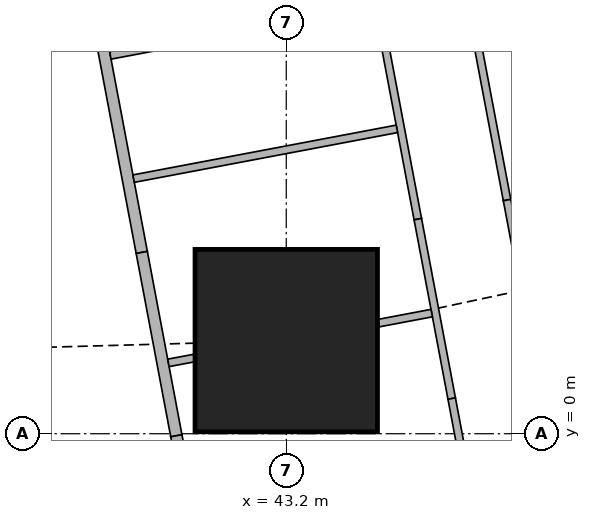
"""IFC4 building model, lengths in metres.
Left out: names, types, materials, properties, quantities, classifications, styles, units other than length and angle.
Written with IfcOpenShell. Run it as: python <this file> out.ifc"""

import sys

from ifc_helpers import new_model, si_unit, direction, frame, frame_2d, origin, origin_2d, place, context, subcontext, project, spatial, rectangle, extrude, element, fill, save


model = new_model("IFC4")
c1 = context("Model", 3, precision=1e-05, world=origin(), true_north=direction((0.0, 1.0)))
c2 = subcontext(c1, "Body", "Model", "MODEL_VIEW")
j1 = project(units=[si_unit("LENGTHUNIT", "METRE"), si_unit("PLANEANGLEUNIT", "RADIAN")], contexts=[c1])
p1 = place(None, origin())
s1 = spatial("IfcSite", under=j1, at=p1, CompositionType="ELEMENT")
p2 = place(p1, origin())
s2 = spatial("IfcBuilding", under=s1, at=p2, CompositionType="ELEMENT")
p3 = place(p2, frame((0.0, 0.0, 204.95)))
s3 = spatial("IfcBuildingStorey", under=s2, at=p3, CompositionType="ELEMENT", Elevation=204.95)
p4 = place(p3, frame((43.2, 1.225, 0.0), z_axis=(0.0, 0.0, 1.0), x_axis=(1.0, 0.0, 0.0)))
e1 = element("IfcColumn", 1, at=p4, inside=s3, PredefinedType="COLUMN", context=c2, shape_type="SweptSolid", body=[
    extrude(rectangle(XDim=2.4, YDim=2.4, at=origin_2d()), origin(), (0.0, 0.0, 1.0), 3.75),
])
p5 = place(p3, frame((50.653, 2.703, 0.0), z_axis=(0.0, 0.0, 1.0), x_axis=(-0.185612026696, 0.982623109613, 0.0)))
e2 = element("IfcWall", 2, at=p5, inside=s3, PredefinedType="SOLIDWALL", context=c2, shape_type="SweptSolid", body=[
    extrude(rectangle(XDim=41.393, YDim=0.2, at=frame_2d((20.697, 0.0))), origin(), (0.0, 0.0, 1.0), 3.5),
])
p6 = place(p5, frame((1.633, 0.0, 0.9)))
e3 = element("IfcOpeningElement", 3, at=p6, cuts=e2, PredefinedType="OPENING", context=c2, shape_type="SweptSolid", body=[
    extrude(rectangle(XDim=1.8, YDim=1.5, at=frame_2d((0.9, 0.75))), frame((0.0, 0.11, 0.0), z_axis=(0.0, -1.0, 0.0), x_axis=(1.0, 0.0, 0.0)), (0.0, 0.0, 1.0), 0.22),
])
p7 = place(p5, frame((6.032, 0.0, 0.9)))
e4 = element("IfcOpeningElement", 4, at=p7, cuts=e2, PredefinedType="OPENING", context=c2, shape_type="SweptSolid", body=[
    extrude(rectangle(XDim=1.8, YDim=1.5, at=frame_2d((0.9, 0.75))), frame((0.0, 0.11, 0.0), z_axis=(0.0, -1.0, 0.0), x_axis=(1.0, 0.0, 0.0)), (0.0, 0.0, 1.0), 0.22),
])
p8 = place(p5, frame((9.848, 0.0, 0.9)))
e5 = element("IfcOpeningElement", 5, at=p8, cuts=e2, PredefinedType="OPENING", context=c2, shape_type="SweptSolid", body=[
    extrude(rectangle(XDim=1.8, YDim=1.5, at=frame_2d((0.9, 0.75))), frame((0.0, 0.11, 0.0), z_axis=(0.0, -1.0, 0.0), x_axis=(1.0, 0.0, 0.0)), (0.0, 0.0, 1.0), 0.22),
])
p9 = place(p5, frame((13.664, 0.0, 0.9)))
e6 = element("IfcOpeningElement", 6, at=p9, cuts=e2, PredefinedType="OPENING", context=c2, shape_type="SweptSolid", body=[
    extrude(rectangle(XDim=1.8, YDim=1.5, at=frame_2d((0.9, 0.75))), frame((0.0, 0.11, 0.0), z_axis=(0.0, -1.0, 0.0), x_axis=(1.0, 0.0, 0.0)), (0.0, 0.0, 1.0), 0.22),
])
p10 = place(p5, frame((17.481, 0.0, 0.9)))
e7 = element("IfcOpeningElement", 7, at=p10, cuts=e2, PredefinedType="OPENING", context=c2, shape_type="SweptSolid", body=[
    extrude(rectangle(XDim=1.8, YDim=1.5, at=frame_2d((0.9, 0.75))), frame((0.0, 0.11, 0.0), z_axis=(0.0, -1.0, 0.0), x_axis=(1.0, 0.0, 0.0)), (0.0, 0.0, 1.0), 0.22),
])
p11 = place(p5, frame((21.297, 0.0, 0.9)))
e8 = element("IfcOpeningElement", 8, at=p11, cuts=e2, PredefinedType="OPENING", context=c2, shape_type="SweptSolid", body=[
    extrude(rectangle(XDim=1.8, YDim=1.5, at=frame_2d((0.9, 0.75))), frame((0.0, 0.11, 0.0), z_axis=(0.0, -1.0, 0.0), x_axis=(1.0, 0.0, 0.0)), (0.0, 0.0, 1.0), 0.22),
])
p12 = place(p5, frame((25.113, 0.0, 0.9)))
e9 = element("IfcOpeningElement", 9, at=p12, cuts=e2, PredefinedType="OPENING", context=c2, shape_type="SweptSolid", body=[
    extrude(rectangle(XDim=1.8, YDim=1.5, at=frame_2d((0.9, 0.75))), frame((0.0, 0.11, 0.0), z_axis=(0.0, -1.0, 0.0), x_axis=(1.0, 0.0, 0.0)), (0.0, 0.0, 1.0), 0.22),
])
p13 = place(p5, frame((28.93, 0.0, 0.9)))
e10 = element("IfcOpeningElement", 10, at=p13, cuts=e2, PredefinedType="OPENING", context=c2, shape_type="SweptSolid", body=[
    extrude(rectangle(XDim=1.8, YDim=1.5, at=frame_2d((0.9, 0.75))), frame((0.0, 0.11, 0.0), z_axis=(0.0, -1.0, 0.0), x_axis=(1.0, 0.0, 0.0)), (0.0, 0.0, 1.0), 0.22),
])
p14 = place(p5, frame((32.746, 0.0, 0.9)))
e11 = element("IfcOpeningElement", 11, at=p14, cuts=e2, PredefinedType="OPENING", context=c2, shape_type="SweptSolid", body=[
    extrude(rectangle(XDim=1.8, YDim=1.5, at=frame_2d((0.9, 0.75))), frame((0.0, 0.11, 0.0), z_axis=(0.0, -1.0, 0.0), x_axis=(1.0, 0.0, 0.0)), (0.0, 0.0, 1.0), 0.22),
])
p15 = place(p5, frame((36.481, 0.0, 0.9)))
e12 = element("IfcOpeningElement", 12, at=p15, cuts=e2, PredefinedType="OPENING", context=c2, shape_type="SweptSolid", body=[
    extrude(rectangle(XDim=1.8, YDim=1.5, at=frame_2d((0.9, 0.75))), frame((0.0, 0.11, 0.0), z_axis=(0.0, -1.0, 0.0), x_axis=(1.0, 0.0, 0.0)), (0.0, 0.0, 1.0), 0.22),
])
p16 = place(p3, frame((33.68, 42.723, 0.0), z_axis=(0.0, 0.0, 1.0), x_axis=(0.185601160014, -0.982625162207, 0.0)))
e13 = element("IfcWall", 13, at=p16, inside=s3, PredefinedType="SOLIDWALL", context=c2, shape_type="SweptSolid", body=[
    extrude(rectangle(XDim=41.051, YDim=0.15, at=frame_2d((20.526, 0.0))), origin(), (0.0, 0.0, 1.0), 2.5),
])
p17 = place(p16, frame((12.307, 0.0, 0.0)))
e14 = element("IfcOpeningElement", 14, at=p17, cuts=e13, PredefinedType="OPENING", context=c2, shape_type="SweptSolid", body=[
    extrude(rectangle(XDim=1.0, YDim=2.1, at=frame_2d((0.5, 1.05))), frame((0.0, 0.085, 0.0), z_axis=(0.0, -1.0, 0.0), x_axis=(1.0, 0.0, 0.0)), (0.0, 0.0, 1.0), 0.17),
])
p18 = place(p16, frame((16.123, 0.0, 0.0)))
e15 = element("IfcOpeningElement", 15, at=p18, cuts=e13, PredefinedType="OPENING", context=c2, shape_type="SweptSolid", body=[
    extrude(rectangle(XDim=1.0, YDim=2.1, at=frame_2d((0.5, 1.05))), frame((0.0, 0.085, 0.0), z_axis=(0.0, -1.0, 0.0), x_axis=(1.0, 0.0, 0.0)), (0.0, 0.0, 1.0), 0.17),
])
p19 = place(p16, frame((30.902, 0.0, 0.0)))
e16 = element("IfcOpeningElement", 16, at=p19, cuts=e13, PredefinedType="OPENING", context=c2, shape_type="SweptSolid", body=[
    extrude(rectangle(XDim=1.0, YDim=2.1, at=frame_2d((0.5, 1.05))), frame((0.0, 0.085, 0.0), z_axis=(0.0, -1.0, 0.0), x_axis=(1.0, 0.0, 0.0)), (0.0, 0.0, 1.0), 0.17),
])
p20 = place(p3, frame((41.299, 2.385, 0.0), z_axis=(0.0, 0.0, 1.0), x_axis=(0.18529731833, -0.982682504077, 0.0)))
e17 = element("IfcWall", 17, at=p20, inside=s3, PredefinedType="SOLIDWALL", context=c2, shape_type="SweptSolid", body=[
    extrude(rectangle(XDim=2.455, YDim=0.15, at=frame_2d((1.227, 0.0))), origin(), (0.0, 0.0, 1.0), 2.05),
])
p21 = place(p3, frame((41.754, -0.027, 0.0), z_axis=(0.0, 0.0, 1.0), x_axis=(0.186404157015, -0.982473149886, 0.0)))
e18 = element("IfcWall", 18, at=p21, inside=s3, PredefinedType="SOLIDWALL", context=c2, shape_type="SweptSolid", body=[
    extrude(rectangle(XDim=0.634, YDim=0.15, at=frame_2d((0.317, 0.0))), origin(), (0.0, 0.0, 1.0), 3.5),
])
p22 = place(p3, frame((44.727, 10.366, 0.0), z_axis=(0.0, 0.0, 1.0), x_axis=(0.185678775129, -0.982610498858, 0.0)))
e19 = element("IfcWall", 19, at=p22, inside=s3, PredefinedType="PARTITIONING", context=c2, shape_type="SweptSolid", body=[
    extrude(rectangle(XDim=7.421, YDim=0.1, at=frame_2d((3.71, 0.0))), origin(), (0.0, 0.0, 1.0), 3.5),
])
p23 = place(p22, frame((0.151, 0.0, 0.0)))
e20 = element("IfcOpeningElement", 20, at=p23, cuts=e19, PredefinedType="OPENING", context=c2, shape_type="SweptSolid", body=[
    extrude(rectangle(XDim=0.9, YDim=2.1, at=frame_2d((0.45, 1.05))), frame((0.0, 0.06, 0.0), z_axis=(0.0, -1.0, 0.0), x_axis=(1.0, 0.0, 0.0)), (0.0, 0.0, 1.0), 0.12),
])
p24 = place(p22, frame((4.65, 0.0, 0.0)))
e21 = element("IfcOpeningElement", 21, at=p24, cuts=e19, PredefinedType="OPENING", context=c2, shape_type="SweptSolid", body=[
    extrude(rectangle(XDim=0.9, YDim=2.1, at=frame_2d((0.45, 1.05))), frame((0.0, 0.06, 0.0), z_axis=(0.0, -1.0, 0.0), x_axis=(1.0, 0.0, 0.0)), (0.0, 0.0, 1.0), 0.12),
])
p25 = place(p3, frame((46.105, 3.074, 0.0), z_axis=(0.0, 0.0, 1.0), x_axis=(0.185631845838, -0.982619365681, 0.0)))
e22 = element("IfcWall", 22, at=p25, inside=s3, PredefinedType="PARTITIONING", context=c2, shape_type="SweptSolid", body=[
    extrude(rectangle(XDim=2.403, YDim=0.1, at=frame_2d((1.201, 0.0))), origin(), (0.0, 0.0, 1.0), 2.05),
])
p26 = place(p3, frame((43.949, 8.02, 0.0), z_axis=(0.0, 0.0, 1.0), x_axis=(0.185656792073, -0.982614652627, 0.0)))
e23 = element("IfcWall", 23, at=p26, inside=s3, PredefinedType="PARTITIONING", context=c2, shape_type="SweptSolid", body=[
    extrude(rectangle(XDim=5.289, YDim=0.1, at=frame_2d((2.645, 0.0))), origin(), (0.0, 0.0, 1.0), 3.5),
])
p27 = place(p26, frame((1.2, 0.0, 0.0)))
e24 = element("IfcOpeningElement", 24, at=p27, cuts=e23, PredefinedType="OPENING", context=c2, shape_type="SweptSolid", body=[
    extrude(rectangle(XDim=0.9, YDim=2.1, at=frame_2d((0.45, 1.05))), frame((0.0, 0.06, 0.0), z_axis=(0.0, -1.0, 0.0), x_axis=(1.0, 0.0, 0.0)), (0.0, 0.0, 1.0), 0.12),
])
p28 = place(p26, frame((2.855, 0.0, 0.0)))
e25 = element("IfcOpeningElement", 25, at=p28, cuts=e23, PredefinedType="OPENING", context=c2, shape_type="SweptSolid", body=[
    extrude(rectangle(XDim=0.9, YDim=2.1, at=frame_2d((0.45, 1.05))), frame((0.0, 0.06, 0.0), z_axis=(0.0, -1.0, 0.0), x_axis=(1.0, 0.0, 0.0)), (0.0, 0.0, 1.0), 0.12),
])
p29 = place(p3, frame((44.931, 2.823, 0.0), z_axis=(0.0, 0.0, 1.0), x_axis=(0.185631845838, -0.982619365681, 0.0)))
e26 = element("IfcWall", 26, at=p29, inside=s3, PredefinedType="PARTITIONING", context=c2, shape_type="SweptSolid", body=[
    extrude(rectangle(XDim=2.403, YDim=0.1, at=frame_2d((1.201, 0.0))), origin(), (0.0, 0.0, 1.0), 2.05),
])
p30 = place(p3, frame((45.377, 0.462, 0.0), z_axis=(0.0, 0.0, 1.0), x_axis=(0.185513480919, -0.982641719243, 0.0)))
e27 = element("IfcWall", 27, at=p30, inside=s3, PredefinedType="PARTITIONING", context=c2, shape_type="SweptSolid", body=[
    extrude(rectangle(XDim=1.095, YDim=0.1, at=frame_2d((0.547, 0.0))), origin(), (0.0, 0.0, 1.0), 3.5),
])
p31 = place(p3, frame((45.114, 1.587, 0.0), z_axis=(0.0, 0.0, 1.0), x_axis=(-0.982671022916, -0.185358195723, 0.0)))
e28 = element("IfcWall", 28, at=p31, inside=s3, PredefinedType="PARTITIONING", context=c2, shape_type="SweptSolid", body=[
    extrude(rectangle(XDim=0.717, YDim=0.1, at=frame_2d((0.358, 0.0))), origin(), (0.0, 0.0, 1.0), 2.05),
])
p32 = place(p3, frame((41.99, 0.996, 0.0), z_axis=(0.0, 0.0, 1.0), x_axis=(-0.982639822555, -0.185523527159, 0.0)))
e29 = element("IfcWall", 29, at=p32, inside=s3, PredefinedType="PARTITIONING", context=c2, shape_type="SweptSolid", body=[
    extrude(rectangle(XDim=0.346, YDim=0.1, at=frame_2d((0.173, 0.0))), origin(), (0.0, 0.0, 1.0), 2.05),
])
p33 = place(p3, frame((44.35, 5.631, 0.0), z_axis=(0.0, 0.0, 1.0), x_axis=(-0.982638553676, -0.185530247748, 0.0)))
e30 = element("IfcWall", 30, at=p33, inside=s3, PredefinedType="PARTITIONING", context=c2, shape_type="SweptSolid", body=[
    extrude(rectangle(XDim=3.525, YDim=0.1, at=frame_2d((1.763, 0.0))), origin(), (0.0, 0.0, 1.0), 3.5),
])
p34 = place(p3, frame((41.192, 3.356, 0.0), z_axis=(0.0, 0.0, 1.0), x_axis=(0.982588017646, 0.185797706064, 0.0)))
e31 = element("IfcWall", 31, at=p34, inside=s3, PredefinedType="PARTITIONING", context=c2, shape_type="SweptSolid", body=[
    extrude(rectangle(XDim=3.525, YDim=0.1, at=frame_2d((1.763, 0.0))), origin(), (0.0, 0.0, 1.0), 3.5),
])
p35 = place(p34, frame((1.7, 0.0, 0.0)))
e32 = element("IfcOpeningElement", 32, at=p35, cuts=e31, PredefinedType="OPENING", context=c2, shape_type="SweptSolid", body=[
    extrude(rectangle(XDim=0.9, YDim=2.1, at=frame_2d((0.45, 1.05))), frame((0.0, 0.06, 0.0), z_axis=(0.0, -1.0, 0.0), x_axis=(1.0, 0.0, 0.0)), (0.0, 0.0, 1.0), 0.12),
])
p36 = place(p24, origin())
e33 = element("IfcDoor", 33, at=p36, inside=s3, OperationType="SINGLE_SWING_LEFT", PredefinedType="DOOR", context=c2, shape_type="SweptSolid", body=[
    extrude(rectangle(XDim=0.9, YDim=2.1, at=frame_2d((0.45, 1.05))), frame((0.0, 0.025, 0.0), z_axis=(0.0, -1.0, 0.0), x_axis=(1.0, 0.0, 0.0)), (0.0, 0.0, 1.0), 0.05),
])
fill(e21, e33)
p37 = place(p28, origin())
e34 = element("IfcDoor", 34, at=p37, inside=s3, OperationType="SINGLE_SWING_LEFT", PredefinedType="DOOR", context=c2, shape_type="SweptSolid", body=[
    extrude(rectangle(XDim=0.9, YDim=2.1, at=frame_2d((0.45, 1.05))), frame((0.0, 0.025, 0.0), z_axis=(0.0, -1.0, 0.0), x_axis=(1.0, 0.0, 0.0)), (0.0, 0.0, 1.0), 0.05),
])
fill(e25, e34)
p38 = place(p35, origin())
e35 = element("IfcDoor", 35, at=p38, inside=s3, OperationType="SINGLE_SWING_RIGHT", PredefinedType="DOOR", context=c2, shape_type="SweptSolid", body=[
    extrude(rectangle(XDim=0.9, YDim=2.1, at=frame_2d((0.45, 1.05))), frame((0.0, 0.025, 0.0), z_axis=(0.0, -1.0, 0.0), x_axis=(1.0, 0.0, 0.0)), (0.0, 0.0, 1.0), 0.05),
])
fill(e32, e35)
save(model, sys.argv[1])
